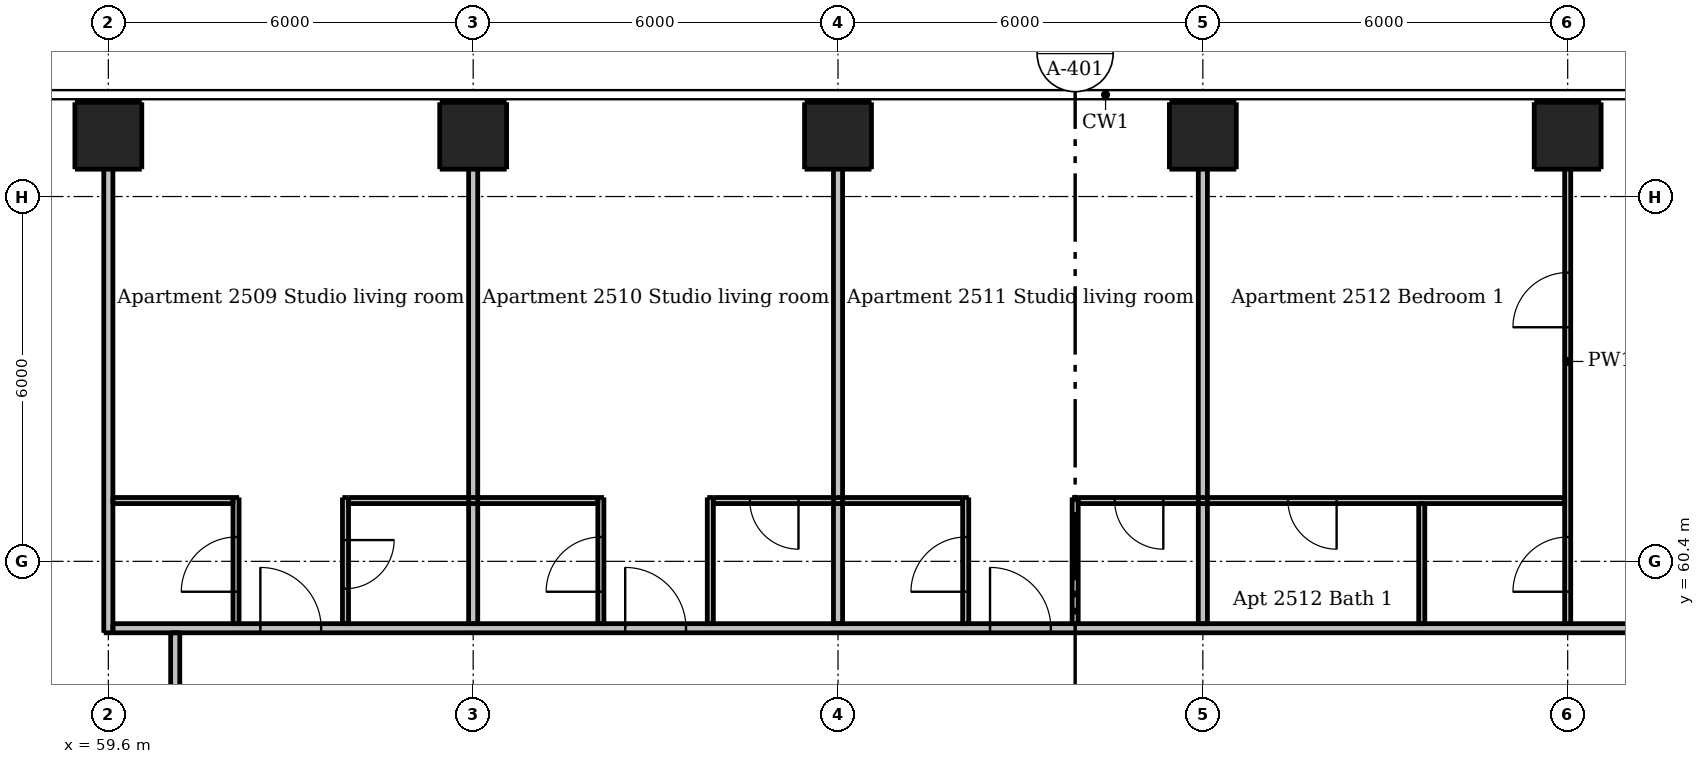
"""IFC4 building model, lengths in metres.
Left out: names, types, materials, properties, quantities, classifications, styles, units other than length and angle.
Written with IfcOpenShell. Run it as: python <this file> out.ifc"""

import sys

from ifc_helpers import new_model, si_unit, direction, frame, frame_2d, origin, origin_2d, place, context, subcontext, project, spatial, rectangle, extrude, element, fill, save


model = new_model("IFC4")
c1 = context("Model", 3, precision=1e-05, world=origin(), true_north=direction((0.0, 1.0)))
c2 = subcontext(c1, "Body", "Model", "MODEL_VIEW")
j1 = project(units=[si_unit("LENGTHUNIT", "METRE"), si_unit("PLANEANGLEUNIT", "RADIAN")], contexts=[c1])
p1 = place(None, origin())
s1 = spatial("IfcSite", under=j1, at=p1, CompositionType="ELEMENT")
p2 = place(p1, origin())
s2 = spatial("IfcBuilding", under=s1, at=p2, CompositionType="ELEMENT")
p3 = place(p2, frame((0.0, 0.0, 95.2)))
s3 = spatial("IfcBuildingStorey", under=s2, at=p3, CompositionType="ELEMENT", Elevation=95.2)
for number, where, z_axis, x_axis in (
    (1, (59.6, 67.4, 0.0), (0.0, 0.0, 1.0), (1.0, 0.0, 0.0)),
    (2, (65.6, 67.4, 0.0), (0.0, 0.0, 1.0), (1.0, 0.0, 0.0)),
    (3, (71.6, 67.4, 0.0), (0.0, 0.0, 1.0), (1.0, 0.0, 0.0)),
    (4, (77.6, 67.4, 0.0), (0.0, 0.0, 1.0), (1.0, 0.0, 0.0)),
    (5, (83.6, 67.4, 0.0), (0.0, 0.0, 1.0), (1.0, 0.0, 0.0)),
):
    element("IfcColumn", number, at=place(p3, frame(where, z_axis=z_axis, x_axis=x_axis)), inside=s3, PredefinedType="COLUMN", context=c2, shape_type="SweptSolid", body=[
        extrude(rectangle(XDim=1.1, YDim=1.1, at=origin_2d()), origin(), (0.0, 0.0, 1.0), 3.05),
    ])
p4 = place(p3, frame((61.7, 59.375, 0.0), z_axis=(0.0, 0.0, 1.0), x_axis=(0.0, 1.0, 0.0)))
e6 = element("IfcWall", 6, at=p4, inside=s3, PredefinedType="PARTITIONING", context=c2, shape_type="SweptSolid", body=[
    extrude(rectangle(XDim=2.075, YDim=0.1, at=frame_2d((1.038, 0.0))), origin(), (0.0, 0.0, 1.0), 3.05),
])
p5 = place(p4, frame((0.525, 0.0, 0.0)))
e7 = element("IfcOpeningElement", 7, at=p5, cuts=e6, PredefinedType="OPENING", context=c2, shape_type="SweptSolid", body=[
    extrude(rectangle(XDim=0.9, YDim=2.1, at=frame_2d((0.45, 1.05))), frame((0.0, 0.06, 0.0), z_axis=(0.0, -1.0, 0.0), x_axis=(1.0, 0.0, 0.0)), (0.0, 0.0, 1.0), 0.12),
])
p6 = place(p3, frame((63.5, 61.45, 0.0), z_axis=(0.0, 0.0, 1.0), x_axis=(0.0, -1.0, 0.0)))
e8 = element("IfcWall", 8, at=p6, inside=s3, PredefinedType="PARTITIONING", context=c2, shape_type="SweptSolid", body=[
    extrude(rectangle(XDim=2.075, YDim=0.1, at=frame_2d((1.038, 0.0))), origin(), (0.0, 0.0, 1.0), 3.05),
])
p7 = place(p6, frame((0.7, 0.0, 0.0)))
e9 = element("IfcOpeningElement", 9, at=p7, cuts=e8, PredefinedType="OPENING", context=c2, shape_type="SweptSolid", body=[
    extrude(rectangle(XDim=0.8, YDim=2.1, at=frame_2d((0.4, 1.05))), frame((0.0, 0.06, 0.0), z_axis=(0.0, -1.0, 0.0), x_axis=(1.0, 0.0, 0.0)), (0.0, 0.0, 1.0), 0.12),
])
p8 = place(p3, frame((67.7, 59.375, 0.0), z_axis=(0.0, 0.0, 1.0), x_axis=(0.0, 1.0, 0.0)))
e10 = element("IfcWall", 10, at=p8, inside=s3, PredefinedType="PARTITIONING", context=c2, shape_type="SweptSolid", body=[
    extrude(rectangle(XDim=2.075, YDim=0.1, at=frame_2d((1.038, 0.0))), origin(), (0.0, 0.0, 1.0), 3.05),
])
p9 = place(p8, frame((0.525, 0.0, 0.0)))
e11 = element("IfcOpeningElement", 11, at=p9, cuts=e10, PredefinedType="OPENING", context=c2, shape_type="SweptSolid", body=[
    extrude(rectangle(XDim=0.9, YDim=2.1, at=frame_2d((0.45, 1.05))), frame((0.0, 0.06, 0.0), z_axis=(0.0, -1.0, 0.0), x_axis=(1.0, 0.0, 0.0)), (0.0, 0.0, 1.0), 0.12),
])
p10 = place(p3, frame((69.5, 59.375, 0.0), z_axis=(0.0, 0.0, 1.0), x_axis=(0.0, 1.0, 0.0)))
e12 = element("IfcWall", 12, at=p10, inside=s3, PredefinedType="PARTITIONING", context=c2, shape_type="SweptSolid", body=[
    extrude(rectangle(XDim=2.075, YDim=0.1, at=frame_2d((1.038, 0.0))), origin(), (0.0, 0.0, 1.0), 3.05),
])
p11 = place(p3, frame((73.7, 59.375, 0.0), z_axis=(0.0, 0.0, 1.0), x_axis=(0.0, 1.0, 0.0)))
e13 = element("IfcWall", 13, at=p11, inside=s3, PredefinedType="PARTITIONING", context=c2, shape_type="SweptSolid", body=[
    extrude(rectangle(XDim=2.075, YDim=0.1, at=frame_2d((1.038, 0.0))), origin(), (0.0, 0.0, 1.0), 3.05),
])
p12 = place(p11, frame((0.525, 0.0, 0.0)))
e14 = element("IfcOpeningElement", 14, at=p12, cuts=e13, PredefinedType="OPENING", context=c2, shape_type="SweptSolid", body=[
    extrude(rectangle(XDim=0.9, YDim=2.1, at=frame_2d((0.45, 1.05))), frame((0.0, 0.06, 0.0), z_axis=(0.0, -1.0, 0.0), x_axis=(1.0, 0.0, 0.0)), (0.0, 0.0, 1.0), 0.12),
])
p13 = place(p3, frame((75.5, 59.375, 0.0), z_axis=(0.0, 0.0, 1.0), x_axis=(0.0, 1.0, 0.0)))
e15 = element("IfcWall", 15, at=p13, inside=s3, PredefinedType="PARTITIONING", context=c2, shape_type="SweptSolid", body=[
    extrude(rectangle(XDim=2.075, YDim=0.1, at=frame_2d((1.038, 0.0))), origin(), (0.0, 0.0, 1.0), 3.05),
])
p14 = place(p3, frame((81.2, 59.375, 0.0), z_axis=(0.0, 0.0, 1.0), x_axis=(0.0, 1.0, 0.0)))
e16 = element("IfcWall", 16, at=p14, inside=s3, PredefinedType="PARTITIONING", context=c2, shape_type="SweptSolid", body=[
    extrude(rectangle(XDim=1.975, YDim=0.1, at=frame_2d((0.988, 0.0))), origin(), (0.0, 0.0, 1.0), 3.05),
])
p15 = place(p3, frame((83.6, 59.375, 0.0), z_axis=(0.0, 0.0, 1.0), x_axis=(0.0, 1.0, 0.0)))
e17 = element("IfcWall", 17, at=p15, inside=s3, PredefinedType="PARTITIONING", context=c2, shape_type="SweptSolid", body=[
    extrude(rectangle(XDim=8.625, YDim=0.1, at=frame_2d((4.312, 0.0))), origin(), (0.0, 0.0, 1.0), 2.516),
])
p16 = place(p15, frame((0.525, 0.0, 0.0)))
e18 = element("IfcOpeningElement", 18, at=p16, cuts=e17, PredefinedType="OPENING", context=c2, shape_type="SweptSolid", body=[
    extrude(rectangle(XDim=0.9, YDim=2.1, at=frame_2d((0.45, 1.05))), frame((0.0, 0.06, 0.0), z_axis=(0.0, -1.0, 0.0), x_axis=(1.0, 0.0, 0.0)), (0.0, 0.0, 1.0), 0.12),
])
p17 = place(p15, frame((4.875, 0.0, 0.0)))
e19 = element("IfcOpeningElement", 19, at=p17, cuts=e17, PredefinedType="OPENING", context=c2, shape_type="SweptSolid", body=[
    extrude(rectangle(XDim=0.9, YDim=2.1, at=frame_2d((0.45, 1.05))), frame((0.0, 0.06, 0.0), z_axis=(0.0, -1.0, 0.0), x_axis=(1.0, 0.0, 0.0)), (0.0, 0.0, 1.0), 0.12),
])
p18 = place(p3, frame((59.675, 61.4, 0.0), z_axis=(0.0, 0.0, 1.0), x_axis=(1.0, 0.0, 0.0)))
e20 = element("IfcWall", 20, at=p18, inside=s3, PredefinedType="PARTITIONING", context=c2, shape_type="SweptSolid", body=[
    extrude(rectangle(XDim=1.975, YDim=0.1, at=frame_2d((0.987, 0.0))), origin(), (0.0, 0.0, 1.0), 3.05),
])
p19 = place(p3, frame((63.55, 61.4, 0.0), z_axis=(0.0, 0.0, 1.0), x_axis=(1.0, 0.0, 0.0)))
e21 = element("IfcWall", 21, at=p19, inside=s3, PredefinedType="PARTITIONING", context=c2, shape_type="SweptSolid", body=[
    extrude(rectangle(XDim=4.1, YDim=0.1, at=frame_2d((2.05, 0.0))), origin(), (0.0, 0.0, 1.0), 3.05),
])
p20 = place(p3, frame((73.65, 61.4, 0.0), z_axis=(0.0, 0.0, 1.0), x_axis=(-1.0, 0.0, 0.0)))
e22 = element("IfcWall", 22, at=p20, inside=s3, PredefinedType="PARTITIONING", context=c2, shape_type="SweptSolid", body=[
    extrude(rectangle(XDim=4.1, YDim=0.1, at=frame_2d((2.05, 0.0))), origin(), (0.0, 0.0, 1.0), 3.05),
])
p21 = place(p20, frame((2.7, 0.0, 0.0)))
e23 = element("IfcOpeningElement", 23, at=p21, cuts=e22, PredefinedType="OPENING", context=c2, shape_type="SweptSolid", body=[
    extrude(rectangle(XDim=0.8, YDim=2.1, at=frame_2d((0.4, 1.05))), frame((0.0, 0.06, 0.0), z_axis=(0.0, -1.0, 0.0), x_axis=(1.0, 0.0, 0.0)), (0.0, 0.0, 1.0), 0.12),
])
p22 = place(p3, frame((83.55, 61.4, 0.0), z_axis=(0.0, 0.0, 1.0), x_axis=(-1.0, 0.0, 0.0)))
e24 = element("IfcWall", 24, at=p22, inside=s3, PredefinedType="PARTITIONING", context=c2, shape_type="SweptSolid", body=[
    extrude(rectangle(XDim=8.0, YDim=0.1, at=frame_2d((4.0, 0.0))), origin(), (0.0, 0.0, 1.0), 3.05),
])
p23 = place(p22, frame((6.6, 0.0, 0.0)))
e25 = element("IfcOpeningElement", 25, at=p23, cuts=e24, PredefinedType="OPENING", context=c2, shape_type="SweptSolid", body=[
    extrude(rectangle(XDim=0.8, YDim=2.1, at=frame_2d((0.4, 1.05))), frame((0.0, 0.06, 0.0), z_axis=(0.0, -1.0, 0.0), x_axis=(1.0, 0.0, 0.0)), (0.0, 0.0, 1.0), 0.12),
])
p24 = place(p22, frame((3.75, 0.0, 0.0)))
e26 = element("IfcOpeningElement", 26, at=p24, cuts=e24, PredefinedType="OPENING", context=c2, shape_type="SweptSolid", body=[
    extrude(rectangle(XDim=0.8, YDim=2.1, at=frame_2d((0.4, 1.05))), frame((0.0, 0.06, 0.0), z_axis=(0.0, -1.0, 0.0), x_axis=(1.0, 0.0, 0.0)), (0.0, 0.0, 1.0), 0.12),
])
p25 = place(p3, frame((59.6, 59.225, 0.0), z_axis=(0.0, 0.0, 1.0), x_axis=(0.0, 1.0, 0.0)))
e27 = element("IfcWall", 27, at=p25, inside=s3, PredefinedType="PARTITIONING", context=c2, shape_type="SweptSolid", body=[
    extrude(rectangle(XDim=8.775, YDim=0.15, at=frame_2d((4.387, 0.0))), origin(), (0.0, 0.0, 1.0), 2.51),
])
p26 = place(p3, frame((60.7, 30.325, 0.0), z_axis=(0.0, 0.0, 1.0), x_axis=(0.0, 1.0, 0.0)))
e28 = element("IfcWall", 28, at=p26, inside=s3, PredefinedType="PARTITIONING", context=c2, shape_type="SweptSolid", body=[
    extrude(rectangle(XDim=28.9, YDim=0.15, at=frame_2d((14.45, 0.0))), origin(), (0.0, 0.0, 1.0), 3.05),
])
p27 = place(p26, frame((2.575, 0.0, 0.0)))
e29 = element("IfcOpeningElement", 29, at=p27, cuts=e28, PredefinedType="OPENING", context=c2, shape_type="SweptSolid", body=[
    extrude(rectangle(XDim=1.0, YDim=2.1, at=frame_2d((0.5, 1.05))), frame((0.0, 0.085, 0.0), z_axis=(0.0, -1.0, 0.0), x_axis=(1.0, 0.0, 0.0)), (0.0, 0.0, 1.0), 0.17),
])
p28 = place(p26, frame((8.575, 0.0, 0.0)))
e30 = element("IfcOpeningElement", 30, at=p28, cuts=e28, PredefinedType="OPENING", context=c2, shape_type="SweptSolid", body=[
    extrude(rectangle(XDim=1.0, YDim=2.1, at=frame_2d((0.5, 1.05))), frame((0.0, 0.085, 0.0), z_axis=(0.0, -1.0, 0.0), x_axis=(1.0, 0.0, 0.0)), (0.0, 0.0, 1.0), 0.17),
])
p29 = place(p26, frame((14.575, 0.0, 0.0)))
e31 = element("IfcOpeningElement", 31, at=p29, cuts=e28, PredefinedType="OPENING", context=c2, shape_type="SweptSolid", body=[
    extrude(rectangle(XDim=1.0, YDim=2.1, at=frame_2d((0.5, 1.05))), frame((0.0, 0.085, 0.0), z_axis=(0.0, -1.0, 0.0), x_axis=(1.0, 0.0, 0.0)), (0.0, 0.0, 1.0), 0.17),
])
p30 = place(p26, frame((26.025, 0.0, 0.0)))
e32 = element("IfcOpeningElement", 32, at=p30, cuts=e28, PredefinedType="OPENING", context=c2, shape_type="SweptSolid", body=[
    extrude(rectangle(XDim=1.0, YDim=2.1, at=frame_2d((0.5, 1.05))), frame((0.0, 0.085, 0.0), z_axis=(0.0, -1.0, 0.0), x_axis=(1.0, 0.0, 0.0)), (0.0, 0.0, 1.0), 0.17),
])
for number, where, z_axis, x_axis in (
    (33, (65.6, 59.375, 0.0), (0.0, 0.0, 1.0), (0.0, 1.0, 0.0)),
    (34, (71.6, 59.375, 0.0), (0.0, 0.0, 1.0), (0.0, 1.0, 0.0)),
    (35, (77.6, 59.375, 0.0), (0.0, 0.0, 1.0), (0.0, 1.0, 0.0)),
):
    element("IfcWall", number, at=place(p3, frame(where, z_axis=z_axis, x_axis=x_axis)), inside=s3, PredefinedType="PARTITIONING", context=c2, shape_type="SweptSolid", body=[
        extrude(rectangle(XDim=8.625, YDim=0.15, at=frame_2d((4.312, 0.0))), origin(), (0.0, 0.0, 1.0), 2.516),
    ])
p31 = place(p3, frame((59.675, 59.3, 0.0), z_axis=(0.0, 0.0, 1.0), x_axis=(1.0, 0.0, 0.0)))
e36 = element("IfcWall", 36, at=p31, inside=s3, PredefinedType="PARTITIONING", context=c2, shape_type="SweptSolid", body=[
    extrude(rectangle(XDim=28.55, YDim=0.15, at=frame_2d((14.275, 0.0))), origin(), (0.0, 0.0, 1.0), 3.05),
])
p32 = place(p31, frame((2.425, 0.0, 0.0)))
e37 = element("IfcOpeningElement", 37, at=p32, cuts=e36, PredefinedType="OPENING", context=c2, shape_type="SweptSolid", body=[
    extrude(rectangle(XDim=1.0, YDim=2.1, at=frame_2d((0.5, 1.05))), frame((0.0, 0.085, 0.0), z_axis=(0.0, -1.0, 0.0), x_axis=(1.0, 0.0, 0.0)), (0.0, 0.0, 1.0), 0.17),
])
p33 = place(p31, frame((8.425, 0.0, 0.0)))
e38 = element("IfcOpeningElement", 38, at=p33, cuts=e36, PredefinedType="OPENING", context=c2, shape_type="SweptSolid", body=[
    extrude(rectangle(XDim=1.0, YDim=2.1, at=frame_2d((0.5, 1.05))), frame((0.0, 0.085, 0.0), z_axis=(0.0, -1.0, 0.0), x_axis=(1.0, 0.0, 0.0)), (0.0, 0.0, 1.0), 0.17),
])
p34 = place(p31, frame((14.425, 0.0, 0.0)))
e39 = element("IfcOpeningElement", 39, at=p34, cuts=e36, PredefinedType="OPENING", context=c2, shape_type="SweptSolid", body=[
    extrude(rectangle(XDim=1.0, YDim=2.1, at=frame_2d((0.5, 1.05))), frame((0.0, 0.085, 0.0), z_axis=(0.0, -1.0, 0.0), x_axis=(1.0, 0.0, 0.0)), (0.0, 0.0, 1.0), 0.17),
])
p35 = place(p31, frame((25.775, 0.0, 0.0)))
e40 = element("IfcOpeningElement", 40, at=p35, cuts=e36, PredefinedType="OPENING", context=c2, shape_type="SweptSolid", body=[
    extrude(rectangle(XDim=1.0, YDim=2.1, at=frame_2d((0.5, 1.05))), frame((0.0, 0.085, 0.0), z_axis=(0.0, -1.0, 0.0), x_axis=(1.0, 0.0, 0.0)), (0.0, 0.0, 1.0), 0.17),
])
p36 = place(p32, origin())
e41 = element("IfcDoor", 41, at=p36, inside=s3, OperationType="SINGLE_SWING_LEFT", PredefinedType="DOOR", context=c2, shape_type="SweptSolid", body=[
    extrude(rectangle(XDim=1.0, YDim=2.1, at=frame_2d((0.5, 1.05))), frame((0.0, 0.025, 0.0), z_axis=(0.0, -1.0, 0.0), x_axis=(1.0, 0.0, 0.0)), (0.0, 0.0, 1.0), 0.05),
])
fill(e37, e41)
p37 = place(p5, origin())
e42 = element("IfcDoor", 42, at=p37, inside=s3, OperationType="SINGLE_SWING_LEFT", PredefinedType="DOOR", context=c2, shape_type="SweptSolid", body=[
    extrude(rectangle(XDim=0.9, YDim=2.1, at=frame_2d((0.45, 1.05))), frame((0.0, 0.025, 0.0), z_axis=(0.0, -1.0, 0.0), x_axis=(1.0, 0.0, 0.0)), (0.0, 0.0, 1.0), 0.05),
])
fill(e7, e42)
p38 = place(p7, origin())
e43 = element("IfcDoor", 43, at=p38, inside=s3, OperationType="SINGLE_SWING_LEFT", PredefinedType="DOOR", context=c2, shape_type="SweptSolid", body=[
    extrude(rectangle(XDim=0.8, YDim=2.1, at=frame_2d((0.4, 1.05))), frame((0.0, 0.025, 0.0), z_axis=(0.0, -1.0, 0.0), x_axis=(1.0, 0.0, 0.0)), (0.0, 0.0, 1.0), 0.05),
])
fill(e9, e43)
p39 = place(p33, origin())
e44 = element("IfcDoor", 44, at=p39, inside=s3, OperationType="SINGLE_SWING_LEFT", PredefinedType="DOOR", context=c2, shape_type="SweptSolid", body=[
    extrude(rectangle(XDim=1.0, YDim=2.1, at=frame_2d((0.5, 1.05))), frame((0.0, 0.025, 0.0), z_axis=(0.0, -1.0, 0.0), x_axis=(1.0, 0.0, 0.0)), (0.0, 0.0, 1.0), 0.05),
])
fill(e38, e44)
p40 = place(p9, origin())
e45 = element("IfcDoor", 45, at=p40, inside=s3, OperationType="SINGLE_SWING_LEFT", PredefinedType="DOOR", context=c2, shape_type="SweptSolid", body=[
    extrude(rectangle(XDim=0.9, YDim=2.1, at=frame_2d((0.45, 1.05))), frame((0.0, 0.025, 0.0), z_axis=(0.0, -1.0, 0.0), x_axis=(1.0, 0.0, 0.0)), (0.0, 0.0, 1.0), 0.05),
])
fill(e11, e45)
p41 = place(p21, origin())
e46 = element("IfcDoor", 46, at=p41, inside=s3, OperationType="SINGLE_SWING_LEFT", PredefinedType="DOOR", context=c2, shape_type="SweptSolid", body=[
    extrude(rectangle(XDim=0.8, YDim=2.1, at=frame_2d((0.4, 1.05))), frame((0.0, 0.025, 0.0), z_axis=(0.0, -1.0, 0.0), x_axis=(1.0, 0.0, 0.0)), (0.0, 0.0, 1.0), 0.05),
])
fill(e23, e46)
p42 = place(p34, origin())
e47 = element("IfcDoor", 47, at=p42, inside=s3, OperationType="SINGLE_SWING_LEFT", PredefinedType="DOOR", context=c2, shape_type="SweptSolid", body=[
    extrude(rectangle(XDim=1.0, YDim=2.1, at=frame_2d((0.5, 1.05))), frame((0.0, 0.025, 0.0), z_axis=(0.0, -1.0, 0.0), x_axis=(1.0, 0.0, 0.0)), (0.0, 0.0, 1.0), 0.05),
])
fill(e39, e47)
p43 = place(p12, origin())
e48 = element("IfcDoor", 48, at=p43, inside=s3, OperationType="SINGLE_SWING_LEFT", PredefinedType="DOOR", context=c2, shape_type="SweptSolid", body=[
    extrude(rectangle(XDim=0.9, YDim=2.1, at=frame_2d((0.45, 1.05))), frame((0.0, 0.025, 0.0), z_axis=(0.0, -1.0, 0.0), x_axis=(1.0, 0.0, 0.0)), (0.0, 0.0, 1.0), 0.05),
])
fill(e14, e48)
p44 = place(p23, origin())
e49 = element("IfcDoor", 49, at=p44, inside=s3, OperationType="SINGLE_SWING_LEFT", PredefinedType="DOOR", context=c2, shape_type="SweptSolid", body=[
    extrude(rectangle(XDim=0.8, YDim=2.1, at=frame_2d((0.4, 1.05))), frame((0.0, 0.025, 0.0), z_axis=(0.0, -1.0, 0.0), x_axis=(1.0, 0.0, 0.0)), (0.0, 0.0, 1.0), 0.05),
])
fill(e25, e49)
p45 = place(p16, origin())
e50 = element("IfcDoor", 50, at=p45, inside=s3, OperationType="SINGLE_SWING_LEFT", PredefinedType="DOOR", context=c2, shape_type="SweptSolid", body=[
    extrude(rectangle(XDim=0.9, YDim=2.1, at=frame_2d((0.45, 1.05))), frame((0.0, 0.025, 0.0), z_axis=(0.0, -1.0, 0.0), x_axis=(1.0, 0.0, 0.0)), (0.0, 0.0, 1.0), 0.05),
])
fill(e18, e50)
p46 = place(p17, origin())
e51 = element("IfcDoor", 51, at=p46, inside=s3, OperationType="SINGLE_SWING_LEFT", PredefinedType="DOOR", context=c2, shape_type="SweptSolid", body=[
    extrude(rectangle(XDim=0.9, YDim=2.1, at=frame_2d((0.45, 1.05))), frame((0.0, 0.025, 0.0), z_axis=(0.0, -1.0, 0.0), x_axis=(1.0, 0.0, 0.0)), (0.0, 0.0, 1.0), 0.05),
])
fill(e19, e51)
p47 = place(p24, origin())
e52 = element("IfcDoor", 52, at=p47, inside=s3, OperationType="SINGLE_SWING_LEFT", PredefinedType="DOOR", context=c2, shape_type="SweptSolid", body=[
    extrude(rectangle(XDim=0.8, YDim=2.1, at=frame_2d((0.4, 1.05))), frame((0.0, 0.025, 0.0), z_axis=(0.0, -1.0, 0.0), x_axis=(1.0, 0.0, 0.0)), (0.0, 0.0, 1.0), 0.05),
])
fill(e26, e52)
save(model, sys.argv[1])
